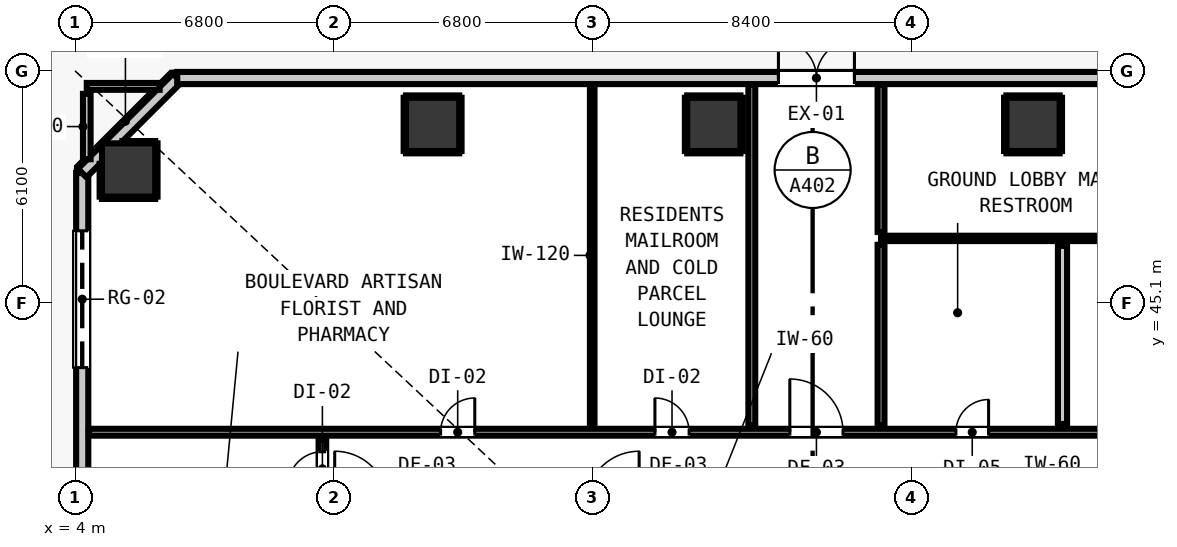
"""IFC4 building model, lengths in metres.
Left out: names, types, materials, properties, quantities, classifications, styles, units other than length and angle.
Written with IfcOpenShell. Run it as: python <this file> out.ifc"""

import sys

from ifc_helpers import new_model, si_unit, direction, frame, frame_2d, origin, origin_2d, place, context, subcontext, project, spatial, rectangle, extrude, element, fill, save


model = new_model("IFC4")
c1 = context("Model", 3, precision=1e-05, world=origin(), true_north=direction((0.0, 1.0)))
c2 = subcontext(c1, "Body", "Model", "MODEL_VIEW")
j1 = project(units=[si_unit("LENGTHUNIT", "METRE"), si_unit("PLANEANGLEUNIT", "RADIAN")], contexts=[c1])
p1 = place(None, origin())
s1 = spatial("IfcSite", under=j1, at=p1, CompositionType="ELEMENT")
p2 = place(p1, origin())
s2 = spatial("IfcBuilding", under=s1, at=p2, CompositionType="ELEMENT")
p3 = place(p2, origin())
s3 = spatial("IfcBuildingStorey", under=s2, at=p3, CompositionType="ELEMENT", Elevation=0.0)
for number, where, z_axis, x_axis in (
    (1, (13.4, 49.8, 0.0), (0.0, 0.0, 1.0), (1.0, 0.0, 0.0)),
    (2, (20.8, 49.8, 0.0), (0.0, 0.0, 1.0), (1.0, 0.0, 0.0)),
    (3, (29.2, 49.8, 0.0), (0.0, 0.0, 1.0), (1.0, 0.0, 0.0)),
    (4, (5.4, 48.6, 0.0), (0.0, 0.0, 1.0), (1.0, 0.0, 0.0)),
):
    element("IfcColumn", number, at=place(p3, frame(where, z_axis=z_axis, x_axis=x_axis)), inside=s3, PredefinedType="COLUMN", context=c2, shape_type="SweptSolid", body=[
        extrude(rectangle(XDim=1.4, YDim=1.4, at=origin_2d()), origin(), (0.0, 0.0, 1.0), 5.2),
    ])
p4 = place(p3, frame((4.18, 12.68, 0.0), z_axis=(0.0, 0.0, 1.0), x_axis=(0.0, 1.0, 0.0)))
e5 = element("IfcWall", 5, at=p4, inside=s3, PredefinedType="STANDARD", context=c2, shape_type="SweptSolid", body=[
    extrude(rectangle(XDim=35.84, YDim=0.32, at=frame_2d((17.92, 0.0))), origin(), (0.0, 0.0, 1.0), 4.92),
])
p5 = place(p4, frame((9.87, 0.0, 0.0)))
e6 = element("IfcOpeningElement", 6, at=p5, cuts=e5, PredefinedType="OPENING", context=c2, shape_type="SweptSolid", body=[
    extrude(rectangle(XDim=1.8, YDim=2.4, at=frame_2d((0.9, 1.2))), frame((0.0, 0.17, 0.0), z_axis=(0.0, -1.0, 0.0), x_axis=(1.0, 0.0, 0.0)), (0.0, 0.0, 1.0), 0.34),
])
p6 = place(p4, frame((22.32, 0.0, 0.0)))
e7 = element("IfcOpeningElement", 7, at=p6, cuts=e5, PredefinedType="OPENING", context=c2, shape_type="SweptSolid", body=[
    extrude(rectangle(XDim=2.0, YDim=2.4, at=frame_2d((1.0, 1.2))), frame((0.0, 0.17, 0.0), z_axis=(0.0, -1.0, 0.0), x_axis=(1.0, 0.0, 0.0)), (0.0, 0.0, 1.0), 0.34),
])
p7 = place(p4, frame((30.72, 0.0, 0.0)))
e8 = element("IfcOpeningElement", 8, at=p7, cuts=e5, PredefinedType="OPENING", context=c2, shape_type="SweptSolid", body=[
    extrude(rectangle(XDim=3.6, YDim=2.8, at=frame_2d((1.8, 1.4))), frame((0.0, 0.17, 0.0), z_axis=(0.0, -1.0, 0.0), x_axis=(1.0, 0.0, 0.0)), (0.0, 0.0, 1.0), 0.34),
])
p8 = place(p4, frame((2.6, 0.0, 0.9)))
e9 = element("IfcOpeningElement", 9, at=p8, cuts=e5, PredefinedType="OPENING", context=c2, shape_type="SweptSolid", body=[
    extrude(rectangle(XDim=2.1, YDim=1.9, at=frame_2d((1.05, 0.95))), frame((0.0, 0.17, 0.0), z_axis=(0.0, -1.0, 0.0), x_axis=(1.0, 0.0, 0.0)), (0.0, 0.0, 1.0), 0.34),
])
p9 = place(p3, frame((4.18, 48.52, 0.0), z_axis=(0.0, 0.0, 1.0), x_axis=(0.707106781187, 0.707106781187, 0.0)))
e10 = element("IfcWall", 10, at=p9, inside=s3, PredefinedType="STANDARD", context=c2, shape_type="SweptSolid", body=[
    extrude(rectangle(XDim=3.536, YDim=0.32, at=frame_2d((1.768, 0.0))), origin(), (0.0, 0.0, 1.0), 4.92),
])
p10 = place(p3, frame((6.68, 51.02, 0.0), z_axis=(0.0, 0.0, 1.0), x_axis=(1.0, 0.0, 0.0)))
e11 = element("IfcWall", 11, at=p10, inside=s3, PredefinedType="STANDARD", context=c2, shape_type="SweptSolid", body=[
    extrude(rectangle(XDim=38.64, YDim=0.32, at=frame_2d((19.32, 0.0))), origin(), (0.0, 0.0, 1.0), 4.92),
])
p11 = place(p10, frame((33.92, 0.0, 0.0)))
e12 = element("IfcOpeningElement", 12, at=p11, cuts=e11, PredefinedType="OPENING", context=c2, shape_type="SweptSolid", body=[
    extrude(rectangle(XDim=4.6, YDim=2.6, at=frame_2d((2.3, 1.3))), frame((0.0, 0.17, 0.0), z_axis=(0.0, -1.0, 0.0), x_axis=(1.0, 0.0, 0.0)), (0.0, 0.0, 1.0), 0.34),
])
p12 = place(p10, frame((15.82, 0.0, 0.0)))
e13 = element("IfcOpeningElement", 13, at=p12, cuts=e11, PredefinedType="OPENING", context=c2, shape_type="SweptSolid", body=[
    extrude(rectangle(XDim=2.0, YDim=2.4, at=frame_2d((1.0, 1.2))), frame((0.0, 0.17, 0.0), z_axis=(0.0, -1.0, 0.0), x_axis=(1.0, 0.0, 0.0)), (0.0, 0.0, 1.0), 0.34),
])
p13 = place(p3, frame((4.352, 41.7, 0.0), z_axis=(0.0, 0.0, 1.0), x_axis=(1.0, 0.0, 0.0)))
e14 = element("IfcWall", 14, at=p13, inside=s3, PredefinedType="PARTITIONING", context=c2, shape_type="SweptSolid", body=[
    extrude(rectangle(XDim=34.848, YDim=0.18, at=frame_2d((17.424, 0.0))), origin(), (0.0, 0.0, 1.0), 4.92),
])
p14 = place(p13, frame((18.448, 0.0, 0.0)))
e15 = element("IfcOpeningElement", 15, at=p14, cuts=e14, PredefinedType="OPENING", context=c2, shape_type="SweptSolid", body=[
    extrude(rectangle(XDim=1.4, YDim=2.15, at=frame_2d((0.7, 1.075))), frame((0.0, 0.1, 0.0), z_axis=(0.0, -1.0, 0.0), x_axis=(1.0, 0.0, 0.0)), (0.0, 0.0, 1.0), 0.2),
])
p15 = place(p13, frame((9.258, 0.0, 0.0)))
e16 = element("IfcOpeningElement", 16, at=p15, cuts=e14, PredefinedType="OPENING", context=c2, shape_type="SweptSolid", body=[
    extrude(rectangle(XDim=0.9, YDim=2.1, at=frame_2d((0.45, 1.05))), frame((0.0, 0.1, 0.0), z_axis=(0.0, -1.0, 0.0), x_axis=(1.0, 0.0, 0.0)), (0.0, 0.0, 1.0), 0.2),
])
p16 = place(p13, frame((14.898, 0.0, 0.0)))
e17 = element("IfcOpeningElement", 17, at=p16, cuts=e14, PredefinedType="OPENING", context=c2, shape_type="SweptSolid", body=[
    extrude(rectangle(XDim=0.9, YDim=2.1, at=frame_2d((0.45, 1.05))), frame((0.0, 0.1, 0.0), z_axis=(0.0, -1.0, 0.0), x_axis=(1.0, 0.0, 0.0)), (0.0, 0.0, 1.0), 0.2),
])
p17 = place(p13, frame((22.818, 0.0, 0.0)))
e18 = element("IfcOpeningElement", 18, at=p17, cuts=e14, PredefinedType="OPENING", context=c2, shape_type="SweptSolid", body=[
    extrude(rectangle(XDim=0.86, YDim=2.02, at=frame_2d((0.43, 1.01))), frame((0.0, 0.1, 0.0), z_axis=(0.0, -1.0, 0.0), x_axis=(1.0, 0.0, 0.0)), (0.0, 0.0, 1.0), 0.2),
])
p18 = place(p13, frame((27.518, 0.0, 0.0)))
e19 = element("IfcOpeningElement", 19, at=p18, cuts=e14, PredefinedType="OPENING", context=c2, shape_type="SweptSolid", body=[
    extrude(rectangle(XDim=0.86, YDim=2.02, at=frame_2d((0.43, 1.01))), frame((0.0, 0.1, 0.0), z_axis=(0.0, -1.0, 0.0), x_axis=(1.0, 0.0, 0.0)), (0.0, 0.0, 1.0), 0.2),
])
p19 = place(p13, frame((32.049, 0.0, 0.0)))
e20 = element("IfcOpeningElement", 20, at=p19, cuts=e14, PredefinedType="OPENING", context=c2, shape_type="SweptSolid", body=[
    extrude(rectangle(XDim=0.95, YDim=2.1, at=frame_2d((0.475, 1.05))), frame((0.0, 0.1, 0.0), z_axis=(0.0, -1.0, 0.0), x_axis=(1.0, 0.0, 0.0)), (0.0, 0.0, 1.0), 0.2),
])
p20 = place(p3, frame((4.3, 50.8, 0.0), z_axis=(0.0, 0.0, 1.0), x_axis=(1.0, 0.0, 0.0)))
e21 = element("IfcWall", 21, at=p20, inside=s3, PredefinedType="PARTITIONING", context=c2, shape_type="SweptSolid", body=[
    extrude(rectangle(XDim=1.917, YDim=0.18, at=frame_2d((0.958, 0.0))), origin(), (0.0, 0.0, 1.0), 4.92),
])
p21 = place(p3, frame((25.2, 46.8, 0.0), z_axis=(0.0, 0.0, 1.0), x_axis=(1.0, 0.0, 0.0)))
e22 = element("IfcWall", 22, at=p21, inside=s3, PredefinedType="PARTITIONING", context=c2, shape_type="SweptSolid", body=[
    extrude(rectangle(XDim=14.0, YDim=0.14, at=frame_2d((7.0, 0.0))), origin(), (0.0, 0.0, 1.0), 4.92),
])
p22 = place(p3, frame((29.975, 41.918, 0.0), z_axis=(0.0, 0.0, 1.0), x_axis=(0.0, 1.0, 0.0)))
e23 = element("IfcWall", 23, at=p22, inside=s3, PredefinedType="PARTITIONING", context=c2, shape_type="SweptSolid", body=[
    extrude(rectangle(XDim=4.684, YDim=0.24, at=frame_2d((2.342, 0.0))), origin(), (0.0, 0.0, 1.0), 4.92),
])
p23 = place(p3, frame((4.3, 48.883, 0.0), z_axis=(0.0, 0.0, 1.0), x_axis=(0.0, 1.0, 0.0)))
e24 = element("IfcWall", 24, at=p23, inside=s3, PredefinedType="PARTITIONING", context=c2, shape_type="SweptSolid", body=[
    extrude(rectangle(XDim=1.719, YDim=0.2, at=frame_2d((0.859, 0.0))), origin(), (0.0, 0.0, 1.0), 4.92),
])
p24 = place(p3, frame((10.5, 39.998, 0.0), z_axis=(0.0, 0.0, 1.0), x_axis=(0.0, 1.0, 0.0)))
e25 = element("IfcWall", 25, at=p24, inside=s3, PredefinedType="PARTITIONING", context=c2, shape_type="SweptSolid", body=[
    extrude(rectangle(XDim=1.504, YDim=0.2, at=frame_2d((0.752, 0.0))), origin(), (0.0, 0.0, 1.0), 4.92),
])
p25 = place(p24, frame((0.288, 0.0, 0.0)))
e26 = element("IfcOpeningElement", 26, at=p25, cuts=e25, PredefinedType="OPENING", context=c2, shape_type="SweptSolid", body=[
    extrude(rectangle(XDim=0.9, YDim=2.1, at=frame_2d((0.45, 1.05))), frame((0.0, 0.11, 0.0), z_axis=(0.0, -1.0, 0.0), x_axis=(1.0, 0.0, 0.0)), (0.0, 0.0, 1.0), 0.22),
])
p26 = place(p3, frame((21.8, 41.888, 0.0), z_axis=(0.0, 0.0, 1.0), x_axis=(0.0, 1.0, 0.0)))
e27 = element("IfcWall", 27, at=p26, inside=s3, PredefinedType="PARTITIONING", context=c2, shape_type="SweptSolid", body=[
    extrude(rectangle(XDim=8.96, YDim=0.18, at=frame_2d((4.48, 0.0))), origin(), (0.0, 0.0, 1.0), 4.92),
])
p27 = place(p3, frame((25.2, 41.888, 0.0), z_axis=(0.0, 0.0, 1.0), x_axis=(0.0, 1.0, 0.0)))
e28 = element("IfcWall", 28, at=p27, inside=s3, PredefinedType="PARTITIONING", context=c2, shape_type="SweptSolid", body=[
    extrude(rectangle(XDim=4.744, YDim=0.18, at=frame_2d((2.372, 0.0))), origin(), (0.0, 0.0, 1.0), 4.92),
])
p28 = place(p3, frame((25.2, 46.968, 0.0), z_axis=(0.0, 0.0, 1.0), x_axis=(0.0, 1.0, 0.0)))
e29 = element("IfcWall", 29, at=p28, inside=s3, PredefinedType="PARTITIONING", context=c2, shape_type="SweptSolid", body=[
    extrude(rectangle(XDim=3.88, YDim=0.18, at=frame_2d((1.94, 0.0))), origin(), (0.0, 0.0, 1.0), 4.92),
])
p29 = place(p3, frame((17.6, 41.858, 0.0), z_axis=(0.0, 0.0, 1.0), x_axis=(0.0, 1.0, 0.0)))
e30 = element("IfcWall", 30, at=p29, inside=s3, PredefinedType="PARTITIONING", context=c2, shape_type="SweptSolid", body=[
    extrude(rectangle(XDim=8.99, YDim=0.12, at=frame_2d((4.495, 0.0))), origin(), (0.0, 0.0, 1.0), 4.92),
])
for number, where, z_axis, x_axis in (
    (31, (12.7, 49.068, 0.0), (0.0, 0.0, 1.0), (1.0, 0.0, 0.0)),
    (32, (12.7, 50.532, 0.0), (0.0, 0.0, 1.0), (1.0, 0.0, 0.0)),
):
    element("IfcWall", number, at=place(p3, frame(where, z_axis=z_axis, x_axis=x_axis)), inside=s3, PredefinedType="PARTITIONING", context=c2, shape_type="SweptSolid", body=[
        extrude(rectangle(XDim=1.4, YDim=0.06, at=frame_2d((0.7, 0.0))), origin(), (0.0, 0.0, 1.0), 1.45),
    ])
for number, where, z_axis, x_axis in (
    (33, (12.668, 49.1, 0.0), (0.0, 0.0, 1.0), (0.0, 1.0, 0.0)),
    (34, (14.132, 49.1, 0.0), (0.0, 0.0, 1.0), (0.0, 1.0, 0.0)),
    (35, (20.1, 49.068, 0.0), (0.0, 0.0, 1.0), (1.0, 0.0, 0.0)),
    (36, (20.1, 50.532, 0.0), (0.0, 0.0, 1.0), (1.0, 0.0, 0.0)),
    (37, (20.068, 49.1, 0.0), (0.0, 0.0, 1.0), (0.0, 1.0, 0.0)),
    (38, (21.532, 49.1, 0.0), (0.0, 0.0, 1.0), (0.0, 1.0, 0.0)),
    (39, (28.5, 49.068, 0.0), (0.0, 0.0, 1.0), (1.0, 0.0, 0.0)),
    (40, (28.5, 50.532, 0.0), (0.0, 0.0, 1.0), (1.0, 0.0, 0.0)),
    (41, (28.468, 49.1, 0.0), (0.0, 0.0, 1.0), (0.0, 1.0, 0.0)),
    (42, (29.932, 49.1, 0.0), (0.0, 0.0, 1.0), (0.0, 1.0, 0.0)),
):
    element("IfcWall", number, at=place(p3, frame(where, z_axis=z_axis, x_axis=x_axis)), inside=s3, PredefinedType="PARTITIONING", context=c2, shape_type="SweptSolid", body=[
        extrude(rectangle(XDim=1.4, YDim=0.06, at=frame_2d((0.7, 0.0))), origin(), (0.0, 0.0, 1.0), 1.45),
    ])
p30 = place(p3, frame((4.7, 47.868, 0.0), z_axis=(0.0, 0.0, 1.0), x_axis=(1.0, 0.0, 0.0)))
e43 = element("IfcWall", 43, at=p30, inside=s3, PredefinedType="PARTITIONING", context=c2, shape_type="SweptSolid", body=[
    extrude(rectangle(XDim=1.4, YDim=0.06, at=frame_2d((0.7, 0.0))), origin(), (0.0, 0.0, 1.0), 1.45),
])
for number, where, z_axis, x_axis in (
    (44, (5.239, 49.332, 0.0), (0.0, 0.0, 1.0), (1.0, 0.0, 0.0)),
    (45, (4.668, 47.9, 0.0), (0.0, 0.0, 1.0), (0.0, 1.0, 0.0)),
):
    element("IfcWall", number, at=place(p3, frame(where, z_axis=z_axis, x_axis=x_axis)), inside=s3, PredefinedType="PARTITIONING", context=c2, shape_type="SweptSolid", body=[
        extrude(rectangle(XDim=0.861, YDim=0.06, at=frame_2d((0.431, 0.0))), origin(), (0.0, 0.0, 1.0), 1.45),
    ])
p31 = place(p3, frame((6.132, 47.9, 0.0), z_axis=(0.0, 0.0, 1.0), x_axis=(0.0, 1.0, 0.0)))
e46 = element("IfcWall", 46, at=p31, inside=s3, PredefinedType="PARTITIONING", context=c2, shape_type="SweptSolid", body=[
    extrude(rectangle(XDim=1.4, YDim=0.06, at=frame_2d((0.7, 0.0))), origin(), (0.0, 0.0, 1.0), 1.45),
])
p32 = place(p7, origin())
e47 = element("IfcDoor", 47, at=p32, inside=s3, OperationType="ROLLINGUP", PredefinedType="GATE", context=c2, shape_type="SweptSolid", body=[
    extrude(rectangle(XDim=3.6, YDim=2.8, at=frame_2d((1.8, 1.4))), frame((0.0, 0.025, 0.0), z_axis=(0.0, -1.0, 0.0), x_axis=(1.0, 0.0, 0.0)), (0.0, 0.0, 1.0), 0.05),
])
fill(e8, e47)
p33 = place(p12, origin())
e48 = element("IfcDoor", 48, at=p33, inside=s3, OperationType="DOUBLE_DOOR_SINGLE_SWING", PredefinedType="DOOR", context=c2, shape_type="SweptSolid", body=[
    extrude(rectangle(XDim=2.0, YDim=2.4, at=frame_2d((1.0, 1.2))), frame((0.0, 0.025, 0.0), z_axis=(0.0, -1.0, 0.0), x_axis=(1.0, 0.0, 0.0)), (0.0, 0.0, 1.0), 0.05),
])
fill(e13, e48)
p34 = place(p14, origin())
e49 = element("IfcDoor", 49, at=p34, inside=s3, OperationType="SINGLE_SWING_LEFT", PredefinedType="DOOR", context=c2, shape_type="SweptSolid", body=[
    extrude(rectangle(XDim=1.4, YDim=2.15, at=frame_2d((0.7, 1.075))), frame((0.0, 0.025, 0.0), z_axis=(0.0, -1.0, 0.0), x_axis=(1.0, 0.0, 0.0)), (0.0, 0.0, 1.0), 0.05),
])
fill(e15, e49)
p35 = place(p25, origin())
e50 = element("IfcDoor", 50, at=p35, inside=s3, OperationType="SINGLE_SWING_LEFT", PredefinedType="DOOR", context=c2, shape_type="SweptSolid", body=[
    extrude(rectangle(XDim=0.9, YDim=2.1, at=frame_2d((0.45, 1.05))), frame((0.0, 0.025, 0.0), z_axis=(0.0, -1.0, 0.0), x_axis=(1.0, 0.0, 0.0)), (0.0, 0.0, 1.0), 0.05),
])
fill(e26, e50)
p36 = place(p15, origin())
e51 = element("IfcDoor", 51, at=p36, inside=s3, OperationType="SINGLE_SWING_RIGHT", PredefinedType="DOOR", context=c2, shape_type="SweptSolid", body=[
    extrude(rectangle(XDim=0.9, YDim=2.1, at=frame_2d((0.45, 1.05))), frame((0.0, 0.025, 0.0), z_axis=(0.0, -1.0, 0.0), x_axis=(1.0, 0.0, 0.0)), (0.0, 0.0, 1.0), 0.05),
])
fill(e16, e51)
p37 = place(p16, origin())
e52 = element("IfcDoor", 52, at=p37, inside=s3, OperationType="SINGLE_SWING_LEFT", PredefinedType="DOOR", context=c2, shape_type="SweptSolid", body=[
    extrude(rectangle(XDim=0.9, YDim=2.1, at=frame_2d((0.45, 1.05))), frame((0.0, 0.025, 0.0), z_axis=(0.0, -1.0, 0.0), x_axis=(1.0, 0.0, 0.0)), (0.0, 0.0, 1.0), 0.05),
])
fill(e17, e52)
p38 = place(p17, origin())
e53 = element("IfcDoor", 53, at=p38, inside=s3, OperationType="SINGLE_SWING_RIGHT", PredefinedType="DOOR", context=c2, shape_type="SweptSolid", body=[
    extrude(rectangle(XDim=0.86, YDim=2.02, at=frame_2d((0.43, 1.01))), frame((0.0, 0.025, 0.0), z_axis=(0.0, -1.0, 0.0), x_axis=(1.0, 0.0, 0.0)), (0.0, 0.0, 1.0), 0.05),
])
fill(e18, e53)
save(model, sys.argv[1])
